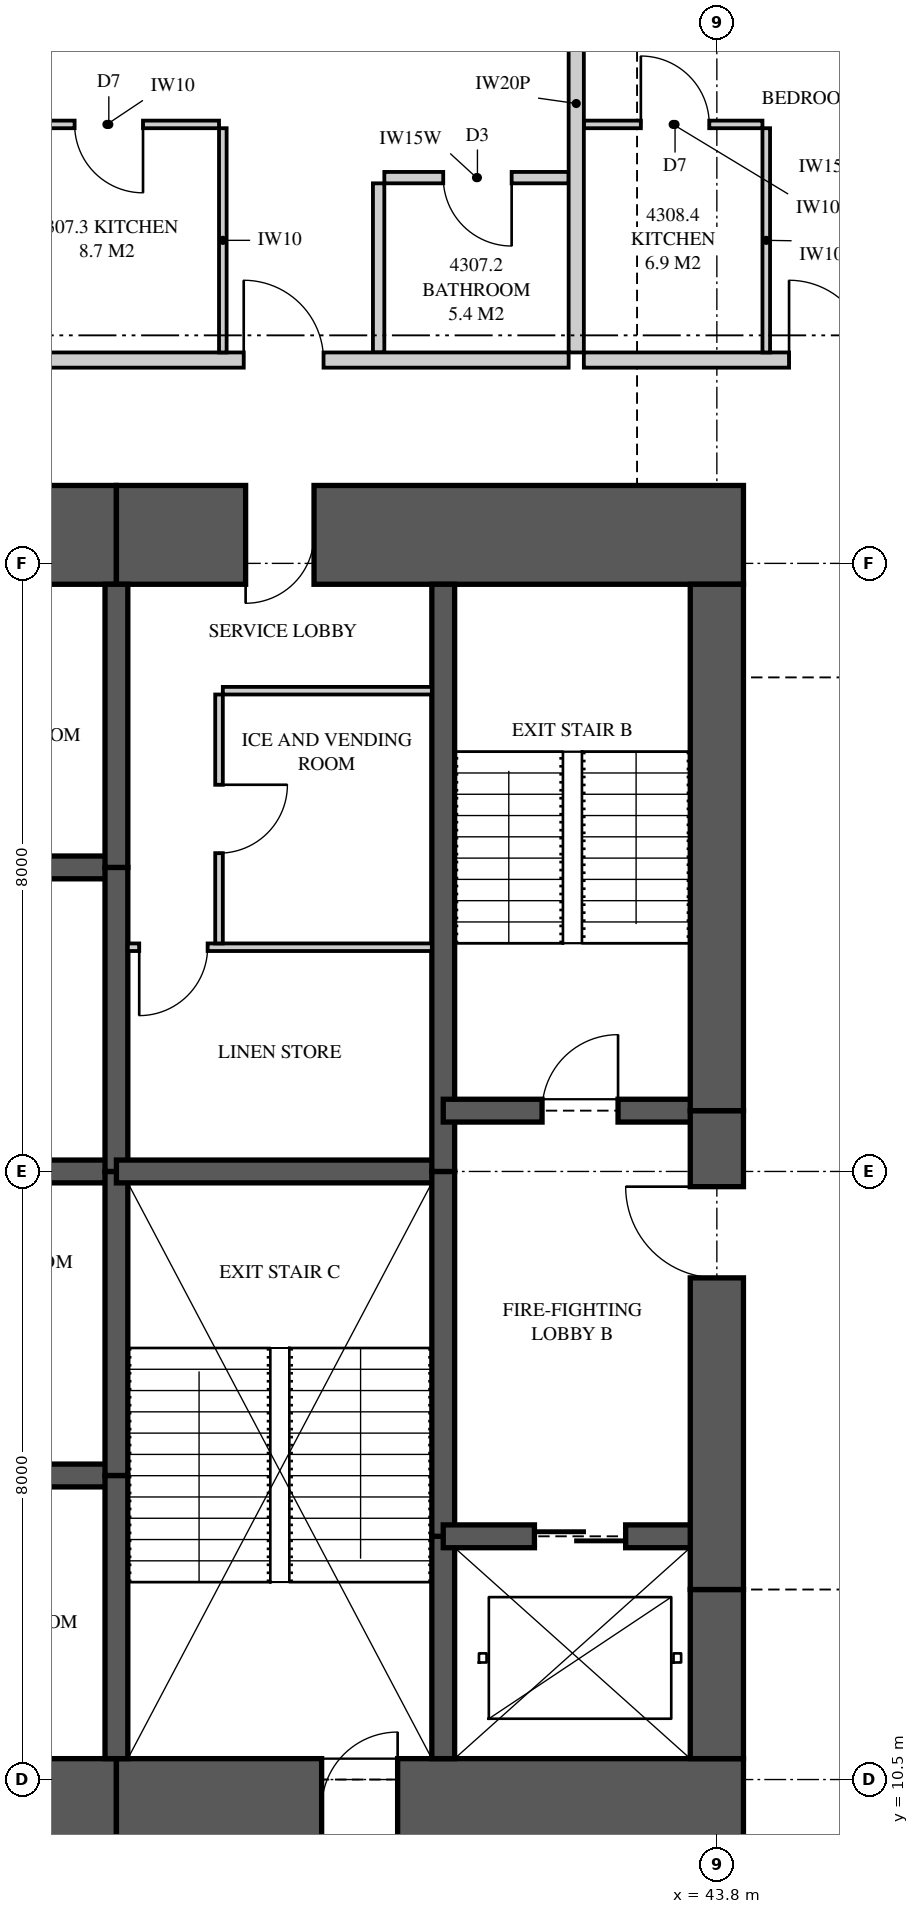
"""IFC4 building model, lengths in metres.
Left out: names, types, materials, properties, quantities, classifications, styles, units other than length and angle.
Written with IfcOpenShell. Run it as: python <this file> out.ifc"""

import sys

from ifc_helpers import new_model, si_unit, direction, frame, frame_2d, origin, place, context, subcontext, project, spatial, polyline, rectangle, outline, extrude, element, fill, save


model = new_model("IFC4")
c1 = context("Model", 3, precision=1e-05, world=origin(), true_north=direction((0.0, 1.0)))
c2 = subcontext(c1, "Body", "Model", "MODEL_VIEW")
j1 = project(units=[si_unit("LENGTHUNIT", "METRE"), si_unit("PLANEANGLEUNIT", "RADIAN")], contexts=[c1])
p1 = place(None, origin())
s1 = spatial("IfcSite", under=j1, at=p1, CompositionType="ELEMENT")
p2 = place(p1, origin())
s2 = spatial("IfcBuilding", under=s1, at=p2, CompositionType="ELEMENT")
p3 = place(p2, frame((0.0, 0.0, 161.05)))
s3 = spatial("IfcBuildingStorey", under=s2, at=p3, CompositionType="ELEMENT", Elevation=161.05)
p4 = place(p3, frame((31.6, 10.125, 0.0), z_axis=(0.0, 0.0, 1.0), x_axis=(1.0, 0.0, 0.0)))
e1 = element("IfcWall", 1, at=p4, inside=s3, PredefinedType="SHEAR", context=c2, shape_type="SweptSolid", body=[
    extrude(rectangle(XDim=4.3, YDim=1.3, at=frame_2d((2.15, 0.0))), origin(), (0.0, 0.0, 1.0), 3.35),
])
p5 = place(p3, frame((35.9, 10.125, 0.0), z_axis=(0.0, 0.0, 1.0), x_axis=(1.0, 0.0, 0.0)))
e2 = element("IfcWall", 2, at=p5, inside=s3, PredefinedType="SHEAR", context=c2, shape_type="SweptSolid", body=[
    extrude(rectangle(XDim=8.25, YDim=1.3, at=frame_2d((4.125, 0.0))), origin(), (0.0, 0.0, 1.0), 3.35),
])
p6 = place(p5, frame((2.7, 0.0, 0.0)))
e3 = element("IfcOpeningElement", 3, at=p6, cuts=e2, PredefinedType="OPENING", context=c2, shape_type="SweptSolid", body=[
    extrude(rectangle(XDim=1.0, YDim=2.1, at=frame_2d((0.5, 1.05))), frame((0.0, 0.66, 0.0), z_axis=(0.0, -1.0, 0.0), x_axis=(1.0, 0.0, 0.0)), (0.0, 0.0, 1.0), 1.32),
])
p7 = place(p3, frame((44.15, 26.875, 0.0), z_axis=(0.0, 0.0, 1.0), x_axis=(-1.0, 0.0, 0.0)))
e4 = element("IfcWall", 4, at=p7, inside=s3, PredefinedType="SHEAR", context=c2, shape_type="SweptSolid", body=[
    extrude(rectangle(XDim=8.25, YDim=1.3, at=frame_2d((4.125, 0.0))), origin(), (0.0, 0.0, 1.0), 3.35),
])
p8 = place(p7, frame((5.65, 0.0, 0.0)))
e5 = element("IfcOpeningElement", 5, at=p8, cuts=e4, PredefinedType="OPENING", context=c2, shape_type="SweptSolid", body=[
    extrude(rectangle(XDim=0.9, YDim=2.1, at=frame_2d((0.45, 1.05))), frame((0.0, 0.66, 0.0), z_axis=(0.0, -1.0, 0.0), x_axis=(1.0, 0.0, 0.0)), (0.0, 0.0, 1.0), 1.32),
])
p9 = place(p3, frame((35.9, 26.875, 0.0), z_axis=(0.0, 0.0, 1.0), x_axis=(-1.0, 0.0, 0.0)))
e6 = element("IfcWall", 6, at=p9, inside=s3, PredefinedType="SHEAR", context=c2, shape_type="SweptSolid", body=[
    extrude(rectangle(XDim=4.3, YDim=1.3, at=frame_2d((2.15, 0.0))), origin(), (0.0, 0.0, 1.0), 3.35),
])
p10 = place(p3, frame((43.8, 10.775, 0.0), z_axis=(0.0, 0.0, 1.0), x_axis=(0.0, 1.0, 0.0)))
e7 = element("IfcWall", 7, at=p10, inside=s3, PredefinedType="SHEAR", context=c2, shape_type="SweptSolid", body=[
    extrude(rectangle(XDim=2.225, YDim=0.7, at=frame_2d((1.113, 0.0))), origin(), (0.0, 0.0, 1.0), 3.35),
])
p11 = place(p3, frame((43.8, 13.0, 0.0), z_axis=(0.0, 0.0, 1.0), x_axis=(0.0, 1.0, 0.0)))
e8 = element("IfcWall", 8, at=p11, inside=s3, PredefinedType="SHEAR", context=c2, shape_type="SweptSolid", body=[
    extrude(rectangle(XDim=6.3, YDim=0.7, at=frame_2d((3.15, 0.0))), origin(), (0.0, 0.0, 1.0), 3.35),
])
p12 = place(p11, frame((4.1, 0.0, 0.0)))
e9 = element("IfcOpeningElement", 9, at=p12, cuts=e8, PredefinedType="OPENING", context=c2, shape_type="SweptSolid", body=[
    extrude(rectangle(XDim=1.2, YDim=2.2, at=frame_2d((0.6, 1.1))), frame((0.0, 0.36, 0.0), z_axis=(0.0, -1.0, 0.0), x_axis=(1.0, 0.0, 0.0)), (0.0, 0.0, 1.0), 0.72),
])
p13 = place(p3, frame((43.8, 19.3, 0.0), z_axis=(0.0, 0.0, 1.0), x_axis=(0.0, 1.0, 0.0)))
e10 = element("IfcWall", 10, at=p13, inside=s3, PredefinedType="SHEAR", context=c2, shape_type="SweptSolid", body=[
    extrude(rectangle(XDim=6.925, YDim=0.7, at=frame_2d((3.462, 0.0))), origin(), (0.0, 0.0, 1.0), 3.35),
])
p14 = place(p3, frame((35.9, 10.775, 0.0), z_axis=(0.0, 0.0, 1.0), x_axis=(0.0, 1.0, 0.0)))
e11 = element("IfcWall", 11, at=p14, inside=s3, PredefinedType="SHEAR", context=c2, shape_type="SweptSolid", body=[
    extrude(rectangle(XDim=3.725, YDim=0.3, at=frame_2d((1.863, 0.0))), origin(), (0.0, 0.0, 1.0), 3.35),
])
for number, where, z_axis, x_axis in (
    (12, (35.9, 14.5, 0.0), (0.0, 0.0, 1.0), (0.0, 1.0, 0.0)),
    (13, (35.9, 18.5, 0.0), (0.0, 0.0, 1.0), (0.0, 1.0, 0.0)),
):
    element("IfcWall", number, at=place(p3, frame(where, z_axis=z_axis, x_axis=x_axis)), inside=s3, PredefinedType="SHEAR", context=c2, shape_type="SweptSolid", body=[
        extrude(rectangle(XDim=4.0, YDim=0.3, at=frame_2d((2.0, 0.0))), origin(), (0.0, 0.0, 1.0), 3.35),
    ])
p15 = place(p3, frame((35.9, 22.5, 0.0), z_axis=(0.0, 0.0, 1.0), x_axis=(0.0, 1.0, 0.0)))
e14 = element("IfcWall", 14, at=p15, inside=s3, PredefinedType="SHEAR", context=c2, shape_type="SweptSolid", body=[
    extrude(rectangle(XDim=3.725, YDim=0.3, at=frame_2d((1.863, 0.0))), origin(), (0.0, 0.0, 1.0), 3.35),
])
p16 = place(p3, frame((40.2, 10.775, 0.0), z_axis=(0.0, 0.0, 1.0), x_axis=(0.0, 1.0, 0.0)))
e15 = element("IfcWall", 15, at=p16, inside=s3, PredefinedType="SHEAR", context=c2, shape_type="SweptSolid", body=[
    extrude(rectangle(XDim=2.925, YDim=0.3, at=frame_2d((1.462, 0.0))), origin(), (0.0, 0.0, 1.0), 3.35),
])
p17 = place(p3, frame((40.2, 13.7, 0.0), z_axis=(0.0, 0.0, 1.0), x_axis=(0.0, 1.0, 0.0)))
e16 = element("IfcWall", 16, at=p17, inside=s3, PredefinedType="SHEAR", context=c2, shape_type="SweptSolid", body=[
    extrude(rectangle(XDim=4.8, YDim=0.3, at=frame_2d((2.4, 0.0))), origin(), (0.0, 0.0, 1.0), 3.35),
])
p18 = place(p3, frame((40.2, 18.5, 0.0), z_axis=(0.0, 0.0, 1.0), x_axis=(0.0, 1.0, 0.0)))
e17 = element("IfcWall", 17, at=p18, inside=s3, PredefinedType="SHEAR", context=c2, shape_type="SweptSolid", body=[
    extrude(rectangle(XDim=7.725, YDim=0.3, at=frame_2d((3.863, 0.0))), origin(), (0.0, 0.0, 1.0), 3.35),
])
for number, where, z_axis, x_axis in (
    (18, (31.6, 14.5, 0.0), (0.0, 0.0, 1.0), (1.0, 0.0, 0.0)),
    (19, (31.6, 18.5, 0.0), (0.0, 0.0, 1.0), (1.0, 0.0, 0.0)),
    (20, (31.6, 22.5, 0.0), (0.0, 0.0, 1.0), (1.0, 0.0, 0.0)),
):
    element("IfcWall", number, at=place(p3, frame(where, z_axis=z_axis, x_axis=x_axis)), inside=s3, PredefinedType="SHEAR", context=c2, shape_type="SweptSolid", body=[
        extrude(rectangle(XDim=4.3, YDim=0.3, at=frame_2d((2.15, 0.0))), origin(), (0.0, 0.0, 1.0), 3.35),
    ])
p19 = place(p3, frame((35.9, 18.5, 0.0), z_axis=(0.0, 0.0, 1.0), x_axis=(1.0, 0.0, 0.0)))
e21 = element("IfcWall", 21, at=p19, inside=s3, PredefinedType="SHEAR", context=c2, shape_type="SweptSolid", body=[
    extrude(rectangle(XDim=4.3, YDim=0.3, at=frame_2d((2.15, 0.0))), origin(), (0.0, 0.0, 1.0), 3.35),
])
p20 = place(p3, frame((40.2, 13.7, 0.0), z_axis=(0.0, 0.0, 1.0), x_axis=(1.0, 0.0, 0.0)))
e22 = element("IfcWall", 22, at=p20, inside=s3, PredefinedType="SHEAR", context=c2, shape_type="SweptSolid", body=[
    extrude(rectangle(XDim=3.6, YDim=0.3, at=frame_2d((1.8, 0.0))), origin(), (0.0, 0.0, 1.0), 3.35),
])
p21 = place(p20, frame((1.2, 0.0, 0.0)))
e23 = element("IfcOpeningElement", 23, at=p21, cuts=e22, PredefinedType="OPENING", context=c2, shape_type="SweptSolid", body=[
    extrude(rectangle(XDim=1.2, YDim=2.1, at=frame_2d((0.6, 1.05))), frame((0.0, 0.16, 0.0), z_axis=(0.0, -1.0, 0.0), x_axis=(1.0, 0.0, 0.0)), (0.0, 0.0, 1.0), 0.32),
])
p22 = place(p3, frame((40.2, 19.3, 0.0), z_axis=(0.0, 0.0, 1.0), x_axis=(1.0, 0.0, 0.0)))
e24 = element("IfcWall", 24, at=p22, inside=s3, PredefinedType="SHEAR", context=c2, shape_type="SweptSolid", body=[
    extrude(rectangle(XDim=3.6, YDim=0.3, at=frame_2d((1.8, 0.0))), origin(), (0.0, 0.0, 1.0), 3.35),
])
p23 = place(p22, frame((1.3, 0.0, 0.0)))
e25 = element("IfcOpeningElement", 25, at=p23, cuts=e24, PredefinedType="OPENING", context=c2, shape_type="SweptSolid", body=[
    extrude(rectangle(XDim=1.0, YDim=2.1, at=frame_2d((0.5, 1.05))), frame((0.0, 0.16, 0.0), z_axis=(0.0, -1.0, 0.0), x_axis=(1.0, 0.0, 0.0)), (0.0, 0.0, 1.0), 0.32),
])
p24 = place(p3, frame((41.95, 35.825, 0.0), z_axis=(0.0, 0.0, 1.0), x_axis=(0.0, -1.0, 0.0)))
e26 = element("IfcWall", 26, at=p24, inside=s3, PredefinedType="PARTITIONING", context=c2, shape_type="SweptSolid", body=[
    extrude(outline(polyline([(0.529, 2.15), (0.0, 2.15), (0.0, 0.0), (0.529, 0.0), (0.529, 0.876), (1.021, 0.876), (1.021, 0.0), (6.55, 0.0), (6.55, 3.11), (1.685, 3.11), (1.685, 2.15), (1.021, 2.15), (1.021, 1.273), (0.529, 1.273), (0.529, 2.15)])), frame((0.0, 0.1, 0.0), z_axis=(0.0, -1.0, 0.0), x_axis=(1.0, 0.0, 0.0)), (0.0, 0.0, 1.0), 0.2),
])
p25 = place(p3, frame((34.3, 29.175, 0.0), z_axis=(0.0, 0.0, 1.0), x_axis=(1.0, 0.0, 0.0)))
e27 = element("IfcWall", 27, at=p25, inside=s3, PredefinedType="PARTITIONING", context=c2, shape_type="SweptSolid", body=[
    extrude(rectangle(XDim=7.55, YDim=0.2, at=frame_2d((3.775, 0.0))), origin(), (0.0, 0.0, 1.0), 3.11),
])
p26 = place(p25, frame((3.275, 0.0, 0.0)))
e28 = element("IfcOpeningElement", 28, at=p26, cuts=e27, PredefinedType="OPENING", context=c2, shape_type="SweptSolid", body=[
    extrude(rectangle(XDim=1.05, YDim=2.2, at=frame_2d((0.525, 1.1))), frame((0.0, 0.11, 0.0), z_axis=(0.0, -1.0, 0.0), x_axis=(1.0, 0.0, 0.0)), (0.0, 0.0, 1.0), 0.22),
])
p27 = place(p3, frame((39.425, 31.575, 0.0), z_axis=(0.0, 0.0, 1.0), x_axis=(1.0, 0.0, 0.0)))
e29 = element("IfcWall", 29, at=p27, inside=s3, PredefinedType="PLUMBINGWALL", context=c2, shape_type="SweptSolid", body=[
    extrude(rectangle(XDim=2.425, YDim=0.15, at=frame_2d((1.212, 0.0))), origin(), (0.0, 0.0, 1.0), 3.11),
])
p28 = place(p27, frame((0.775, 0.0, 0.0)))
e30 = element("IfcOpeningElement", 30, at=p28, cuts=e29, PredefinedType="OPENING", context=c2, shape_type="SweptSolid", body=[
    extrude(rectangle(XDim=0.9, YDim=2.1, at=frame_2d((0.45, 1.05))), frame((0.0, 0.085, 0.0), z_axis=(0.0, -1.0, 0.0), x_axis=(1.0, 0.0, 0.0)), (0.0, 0.0, 1.0), 0.17),
])
p29 = place(p3, frame((39.35, 31.5, 0.0), z_axis=(0.0, 0.0, 1.0), x_axis=(0.0, -1.0, 0.0)))
e31 = element("IfcWall", 31, at=p29, inside=s3, PredefinedType="PLUMBINGWALL", context=c2, shape_type="SweptSolid", body=[
    extrude(rectangle(XDim=2.225, YDim=0.15, at=frame_2d((1.113, 0.0))), origin(), (0.0, 0.0, 1.0), 3.11),
])
p30 = place(p3, frame((34.3, 32.275, 0.0), z_axis=(0.0, 0.0, 1.0), x_axis=(1.0, 0.0, 0.0)))
e32 = element("IfcWall", 32, at=p30, inside=s3, PredefinedType="PARTITIONING", context=c2, shape_type="SweptSolid", body=[
    extrude(rectangle(XDim=2.95, YDim=0.1, at=frame_2d((1.475, 0.0))), origin(), (0.0, 0.0, 1.0), 3.11),
])
p31 = place(p30, frame((1.05, 0.0, 0.0)))
e33 = element("IfcOpeningElement", 33, at=p31, cuts=e32, PredefinedType="OPENING", context=c2, shape_type="SweptSolid", body=[
    extrude(rectangle(XDim=0.9, YDim=2.1, at=frame_2d((0.45, 1.05))), frame((0.0, 0.06, 0.0), z_axis=(0.0, -1.0, 0.0), x_axis=(1.0, 0.0, 0.0)), (0.0, 0.0, 1.0), 0.12),
])
p32 = place(p3, frame((37.3, 32.225, 0.0), z_axis=(0.0, 0.0, 1.0), x_axis=(0.0, -1.0, 0.0)))
e34 = element("IfcWall", 34, at=p32, inside=s3, PredefinedType="PARTITIONING", context=c2, shape_type="SweptSolid", body=[
    extrude(rectangle(XDim=2.95, YDim=0.1, at=frame_2d((1.475, 0.0))), origin(), (0.0, 0.0, 1.0), 3.11),
])
p33 = place(p3, frame((42.05, 29.175, 0.0), z_axis=(0.0, 0.0, 1.0), x_axis=(1.0, 0.0, 0.0)))
e35 = element("IfcWall", 35, at=p33, inside=s3, PredefinedType="PARTITIONING", context=c2, shape_type="SweptSolid", body=[
    extrude(outline(polyline([(0.0, 0.0), (3.9, 0.0), (3.9, 3.11), (1.037, 3.11), (1.037, 2.541), (0.363, 2.541), (0.363, 3.11), (0.0, 3.11), (0.0, 0.0)])), frame((0.0, 0.1, 0.0), z_axis=(0.0, -1.0, 0.0), x_axis=(1.0, 0.0, 0.0)), (0.0, 0.0, 1.0), 0.2),
])
p34 = place(p33, frame((2.7, 0.0, 0.0)))
e36 = element("IfcOpeningElement", 36, at=p34, cuts=e35, PredefinedType="OPENING", context=c2, shape_type="SweptSolid", body=[
    extrude(rectangle(XDim=1.05, YDim=2.2, at=frame_2d((0.525, 1.1))), frame((0.0, 0.11, 0.0), z_axis=(0.0, -1.0, 0.0), x_axis=(1.0, 0.0, 0.0)), (0.0, 0.0, 1.0), 0.22),
])
p35 = place(p3, frame((42.05, 32.275, 0.0), z_axis=(0.0, 0.0, 1.0), x_axis=(1.0, 0.0, 0.0)))
e37 = element("IfcWall", 37, at=p35, inside=s3, PredefinedType="PARTITIONING", context=c2, shape_type="SweptSolid", body=[
    extrude(outline(polyline([(0.0, 0.0), (2.35, 0.0), (2.35, 3.11), (0.987, 3.11), (0.987, 2.541), (0.413, 2.541), (0.413, 3.11), (0.0, 3.11), (0.0, 0.0)])), frame((0.0, 0.05, 0.0), z_axis=(0.0, -1.0, 0.0), x_axis=(1.0, 0.0, 0.0)), (0.0, 0.0, 1.0), 0.1),
])
p36 = place(p35, frame((0.75, 0.0, 0.0)))
e38 = element("IfcOpeningElement", 38, at=p36, cuts=e37, PredefinedType="OPENING", context=c2, shape_type="SweptSolid", body=[
    extrude(rectangle(XDim=0.9, YDim=2.1, at=frame_2d((0.45, 1.05))), frame((0.0, 0.06, 0.0), z_axis=(0.0, -1.0, 0.0), x_axis=(1.0, 0.0, 0.0)), (0.0, 0.0, 1.0), 0.12),
])
p37 = place(p3, frame((44.45, 32.225, 0.0), z_axis=(0.0, 0.0, 1.0), x_axis=(0.0, -1.0, 0.0)))
e39 = element("IfcWall", 39, at=p37, inside=s3, PredefinedType="PARTITIONING", context=c2, shape_type="SweptSolid", body=[
    extrude(rectangle(XDim=2.95, YDim=0.1, at=frame_2d((1.475, 0.0))), origin(), (0.0, 0.0, 1.0), 3.11),
])
p38 = place(p3, frame((37.3, 24.825, 0.0), z_axis=(0.0, 0.0, 1.0), x_axis=(1.0, 0.0, 0.0)))
e40 = element("IfcWall", 40, at=p38, inside=s3, PredefinedType="PARTITIONING", context=c2, shape_type="SweptSolid", body=[
    extrude(rectangle(XDim=2.75, YDim=0.1, at=frame_2d((1.375, 0.0))), origin(), (0.0, 0.0, 1.0), 3.11),
])
p39 = place(p3, frame((37.25, 21.5, 0.0), z_axis=(0.0, 0.0, 1.0), x_axis=(0.0, 1.0, 0.0)))
e41 = element("IfcWall", 41, at=p39, inside=s3, PredefinedType="PARTITIONING", context=c2, shape_type="SweptSolid", body=[
    extrude(rectangle(XDim=3.275, YDim=0.1, at=frame_2d((1.637, 0.0))), origin(), (0.0, 0.0, 1.0), 3.11),
])
p40 = place(p39, frame((1.188, 0.0, 0.0)))
e42 = element("IfcOpeningElement", 42, at=p40, cuts=e41, PredefinedType="OPENING", context=c2, shape_type="SweptSolid", body=[
    extrude(rectangle(XDim=0.9, YDim=2.1, at=frame_2d((0.45, 1.05))), frame((0.0, 0.06, 0.0), z_axis=(0.0, -1.0, 0.0), x_axis=(1.0, 0.0, 0.0)), (0.0, 0.0, 1.0), 0.12),
])
p41 = place(p3, frame((36.05, 21.45, 0.0), z_axis=(0.0, 0.0, 1.0), x_axis=(1.0, 0.0, 0.0)))
e43 = element("IfcWall", 43, at=p41, inside=s3, PredefinedType="PARTITIONING", context=c2, shape_type="SweptSolid", body=[
    extrude(rectangle(XDim=4.0, YDim=0.1, at=frame_2d((2.0, 0.0))), origin(), (0.0, 0.0, 1.0), 3.11),
])
p42 = place(p41, frame((0.15, 0.0, 0.0)))
e44 = element("IfcOpeningElement", 44, at=p42, cuts=e43, PredefinedType="OPENING", context=c2, shape_type="SweptSolid", body=[
    extrude(rectangle(XDim=0.9, YDim=2.1, at=frame_2d((0.45, 1.05))), frame((0.0, 0.06, 0.0), z_axis=(0.0, -1.0, 0.0), x_axis=(1.0, 0.0, 0.0)), (0.0, 0.0, 1.0), 0.12),
])
p43 = place(p26, origin())
e45 = element("IfcDoor", 45, at=p43, inside=s3, OperationType="SINGLE_SWING_LEFT", PredefinedType="DOOR", context=c2, shape_type="SweptSolid", body=[
    extrude(rectangle(XDim=1.05, YDim=2.2, at=frame_2d((0.525, 1.1))), frame((0.0, 0.025, 0.0), z_axis=(0.0, -1.0, 0.0), x_axis=(1.0, 0.0, 0.0)), (0.0, 0.0, 1.0), 0.05),
])
fill(e28, e45)
p44 = place(p28, frame((0.9, 0.0, 0.0), z_axis=(0.0, 0.0, 1.0), x_axis=(-1.0, 0.0, 0.0)))
e46 = element("IfcDoor", 46, at=p44, inside=s3, OperationType="SINGLE_SWING_LEFT", PredefinedType="DOOR", context=c2, shape_type="SweptSolid", body=[
    extrude(rectangle(XDim=0.9, YDim=2.1, at=frame_2d((0.45, 1.05))), frame((0.0, 0.025, 0.0), z_axis=(0.0, -1.0, 0.0), x_axis=(1.0, 0.0, 0.0)), (0.0, 0.0, 1.0), 0.05),
])
fill(e30, e46)
p45 = place(p31, frame((0.9, 0.0, 0.0), z_axis=(0.0, 0.0, 1.0), x_axis=(-1.0, 0.0, 0.0)))
e47 = element("IfcDoor", 47, at=p45, inside=s3, OperationType="SINGLE_SWING_LEFT", PredefinedType="DOOR", context=c2, shape_type="SweptSolid", body=[
    extrude(rectangle(XDim=0.9, YDim=2.1, at=frame_2d((0.45, 1.05))), frame((0.0, 0.025, 0.0), z_axis=(0.0, -1.0, 0.0), x_axis=(1.0, 0.0, 0.0)), (0.0, 0.0, 1.0), 0.05),
])
fill(e33, e47)
p46 = place(p34, origin())
e48 = element("IfcDoor", 48, at=p46, inside=s3, OperationType="SINGLE_SWING_LEFT", PredefinedType="DOOR", context=c2, shape_type="SweptSolid", body=[
    extrude(rectangle(XDim=1.05, YDim=2.2, at=frame_2d((0.525, 1.1))), frame((0.0, 0.025, 0.0), z_axis=(0.0, -1.0, 0.0), x_axis=(1.0, 0.0, 0.0)), (0.0, 0.0, 1.0), 0.05),
])
fill(e36, e48)
p47 = place(p36, origin())
e49 = element("IfcDoor", 49, at=p47, inside=s3, OperationType="SINGLE_SWING_LEFT", PredefinedType="DOOR", context=c2, shape_type="SweptSolid", body=[
    extrude(rectangle(XDim=0.9, YDim=2.1, at=frame_2d((0.45, 1.05))), frame((0.0, 0.025, 0.0), z_axis=(0.0, -1.0, 0.0), x_axis=(1.0, 0.0, 0.0)), (0.0, 0.0, 1.0), 0.05),
])
fill(e38, e49)
p48 = place(p40, frame((0.9, 0.0, 0.0), z_axis=(0.0, 0.0, 1.0), x_axis=(-1.0, 0.0, 0.0)))
e50 = element("IfcDoor", 50, at=p48, inside=s3, OperationType="SINGLE_SWING_LEFT", PredefinedType="DOOR", context=c2, shape_type="SweptSolid", body=[
    extrude(rectangle(XDim=0.9, YDim=2.1, at=frame_2d((0.45, 1.05))), frame((0.0, 0.025, 0.0), z_axis=(0.0, -1.0, 0.0), x_axis=(1.0, 0.0, 0.0)), (0.0, 0.0, 1.0), 0.05),
])
fill(e42, e50)
p49 = place(p42, frame((0.9, 0.0, 0.0), z_axis=(0.0, 0.0, 1.0), x_axis=(-1.0, 0.0, 0.0)))
e51 = element("IfcDoor", 51, at=p49, inside=s3, OperationType="SINGLE_SWING_RIGHT", PredefinedType="DOOR", context=c2, shape_type="SweptSolid", body=[
    extrude(rectangle(XDim=0.9, YDim=2.1, at=frame_2d((0.45, 1.05))), frame((0.0, 0.025, 0.0), z_axis=(0.0, -1.0, 0.0), x_axis=(1.0, 0.0, 0.0)), (0.0, 0.0, 1.0), 0.05),
])
fill(e44, e51)
p50 = place(p23, origin())
e52 = element("IfcDoor", 52, at=p50, inside=s3, OperationType="SINGLE_SWING_RIGHT", PredefinedType="DOOR", context=c2, shape_type="SweptSolid", body=[
    extrude(rectangle(XDim=1.0, YDim=2.1, at=frame_2d((0.5, 1.05))), frame((0.0, 0.025, 0.0), z_axis=(0.0, -1.0, 0.0), x_axis=(1.0, 0.0, 0.0)), (0.0, 0.0, 1.0), 0.05),
])
fill(e25, e52)
p51 = place(p12, origin())
e53 = element("IfcDoor", 53, at=p51, inside=s3, OperationType="SINGLE_SWING_RIGHT", PredefinedType="DOOR", context=c2, shape_type="SweptSolid", body=[
    extrude(rectangle(XDim=1.2, YDim=2.2, at=frame_2d((0.6, 1.1))), frame((0.0, 0.025, 0.0), z_axis=(0.0, -1.0, 0.0), x_axis=(1.0, 0.0, 0.0)), (0.0, 0.0, 1.0), 0.05),
])
fill(e9, e53)
p52 = place(p21, origin())
e54 = element("IfcDoor", 54, at=p52, inside=s3, OperationType="SLIDING_TO_LEFT", PredefinedType="DOOR", context=c2, shape_type="SweptSolid", body=[
    extrude(rectangle(XDim=1.2, YDim=2.1, at=frame_2d((0.6, 1.05))), frame((0.0, 0.025, 0.0), z_axis=(0.0, -1.0, 0.0), x_axis=(1.0, 0.0, 0.0)), (0.0, 0.0, 1.0), 0.05),
])
fill(e23, e54)
p53 = place(p6, origin())
e55 = element("IfcDoor", 55, at=p53, inside=s3, OperationType="SINGLE_SWING_RIGHT", PredefinedType="DOOR", context=c2, shape_type="SweptSolid", body=[
    extrude(rectangle(XDim=1.0, YDim=2.1, at=frame_2d((0.5, 1.05))), frame((0.0, 0.025, 0.0), z_axis=(0.0, -1.0, 0.0), x_axis=(1.0, 0.0, 0.0)), (0.0, 0.0, 1.0), 0.05),
])
fill(e3, e55)
p54 = place(p8, origin())
e56 = element("IfcDoor", 56, at=p54, inside=s3, OperationType="SINGLE_SWING_RIGHT", PredefinedType="DOOR", context=c2, shape_type="SweptSolid", body=[
    extrude(rectangle(XDim=0.9, YDim=2.1, at=frame_2d((0.45, 1.05))), frame((0.0, 0.47, 0.0), z_axis=(0.0, -1.0, 0.0), x_axis=(1.0, 0.0, 0.0)), (0.0, 0.0, 1.0), 0.8),
])
fill(e5, e56)
save(model, sys.argv[1])
